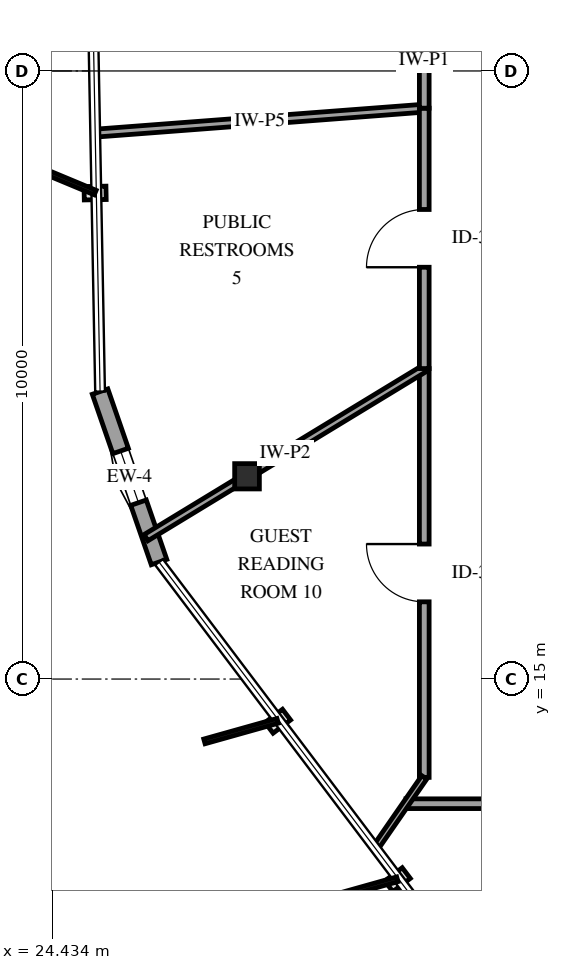
"""IFC4 building model, lengths in metres.
Left out: names, types, materials, properties, quantities, classifications, styles, units other than length and angle.
Written with IfcOpenShell. Run it as: python <this file> out.ifc"""

import sys

from ifc_helpers import new_model, si_unit, direction, frame, frame_2d, origin, origin_2d, place, context, subcontext, project, spatial, rectangle, i_section, extrude, element, fill, save


model = new_model("IFC4")
c1 = context("Model", 3, precision=1e-05, world=origin(), true_north=direction((0.0, 1.0)))
c2 = subcontext(c1, "Body", "Model", "MODEL_VIEW")
j1 = project(units=[si_unit("LENGTHUNIT", "METRE"), si_unit("PLANEANGLEUNIT", "RADIAN")], contexts=[c1])
p1 = place(None, origin())
s1 = spatial("IfcSite", under=j1, at=p1, CompositionType="ELEMENT")
p2 = place(p1, origin())
s2 = spatial("IfcBuilding", under=s1, at=p2, CompositionType="ELEMENT")
p3 = place(p2, frame((0.0, 0.0, 233.8)))
s3 = spatial("IfcBuildingStorey", under=s2, at=p3, CompositionType="ELEMENT", Elevation=233.8)
p4 = place(p3, frame((27.635, 18.334, 0.0), z_axis=(0.0, 0.0, 1.0), x_axis=(1.0, 0.0, 0.0)))
e1 = element("IfcColumn", 1, at=p4, inside=s3, PredefinedType="COLUMN", context=c2, shape_type="SweptSolid", body=[
    extrude(i_section(OverallWidth=0.406, OverallDepth=0.416, WebThickness=0.03, FlangeThickness=0.048, FilletRadius=0.038, at=origin_2d()), origin(), (0.0, 0.0, 1.0), 3.6),
])
p5 = place(p3, frame((25.219, 19.727, 0.0), z_axis=(0.0, 0.0, 1.0), x_axis=(0.326898552416, -0.945059435395, 0.0)))
e2 = element("IfcWall", 2, at=p5, inside=s3, PredefinedType="SOLIDWALL", context=c2, shape_type="SweptSolid", body=[
    extrude(rectangle(XDim=2.967, YDim=0.27, at=frame_2d((1.483, 0.0))), origin(), (0.0, 0.0, 1.0), 2.599),
])
p6 = place(p5, frame((1.033, 0.0, 0.75)))
e3 = element("IfcOpeningElement", 3, at=p6, cuts=e2, PredefinedType="OPENING", context=c2, shape_type="SweptSolid", body=[
    extrude(rectangle(XDim=0.9, YDim=1.5, at=frame_2d((0.45, 0.75))), frame((0.0, 0.145, 0.0), z_axis=(0.0, -1.0, 0.0), x_axis=(1.0, 0.0, 0.0)), (0.0, 0.0, 1.0), 0.29),
])
p7 = place(p3, frame((30.55, 13.383, 0.0), z_axis=(0.0, 0.0, 1.0), x_axis=(0.0, 1.0, 0.0)))
e4 = element("IfcWall", 4, at=p7, inside=s3, PredefinedType="PARTITIONING", context=c2, shape_type="SweptSolid", body=[
    extrude(rectangle(XDim=6.723, YDim=0.16, at=frame_2d((3.361, 0.0))), origin(), (0.0, 0.0, 1.0), 3.26),
])
p8 = place(p7, frame((2.887, 0.0, 0.0)))
e5 = element("IfcOpeningElement", 5, at=p8, cuts=e4, PredefinedType="OPENING", context=c2, shape_type="SweptSolid", body=[
    extrude(rectangle(XDim=0.95, YDim=2.15, at=frame_2d((0.475, 1.075))), frame((0.0, 0.09, 0.0), z_axis=(0.0, -1.0, 0.0), x_axis=(1.0, 0.0, 0.0)), (0.0, 0.0, 1.0), 0.18),
])
p9 = place(p3, frame((35.719, 12.95, 0.0), z_axis=(0.0, 0.0, 1.0), x_axis=(-1.0, 0.0, 0.0)))
e6 = element("IfcWall", 6, at=p9, inside=s3, PredefinedType="PARTITIONING", context=c2, shape_type="SweptSolid", body=[
    extrude(rectangle(XDim=5.469, YDim=0.16, at=frame_2d((2.734, 0.0))), origin(), (0.0, 0.0, 1.0), 3.26),
])
p10 = place(p9, frame((2.26, 0.0, 0.0)))
e7 = element("IfcOpeningElement", 7, at=p10, cuts=e6, PredefinedType="OPENING", context=c2, shape_type="SweptSolid", body=[
    extrude(rectangle(XDim=0.95, YDim=2.15, at=frame_2d((0.475, 1.075))), frame((0.0, 0.09, 0.0), z_axis=(0.0, -1.0, 0.0), x_axis=(1.0, 0.0, 0.0)), (0.0, 0.0, 1.0), 0.18),
])
p11 = place(p3, frame((30.55, 24.388, 0.0), z_axis=(0.0, 0.0, 1.0), x_axis=(-0.997129425625, -0.075715972899, 0.0)))
e8 = element("IfcWall", 8, at=p11, inside=s3, PredefinedType="PARTITIONING", context=c2, shape_type="SweptSolid", body=[
    extrude(rectangle(XDim=5.427, YDim=0.13, at=frame_2d((2.713, 0.0))), origin(), (0.0, 0.0, 1.0), 3.26),
])
p12 = place(p3, frame((30.55, 20.106, 0.0), z_axis=(0.0, 0.0, 1.0), x_axis=(-0.854558444858, -0.519355239043, 0.0)))
e9 = element("IfcWall", 9, at=p12, inside=s3, PredefinedType="PARTITIONING", context=c2, shape_type="SweptSolid", body=[
    extrude(rectangle(XDim=5.355, YDim=0.12, at=frame_2d((2.677, 0.0))), origin(), (0.0, 0.0, 1.0), 3.26),
])
p13 = place(p3, frame((30.55, 20.106, 0.0), z_axis=(0.0, 0.0, 1.0), x_axis=(0.0, 1.0, 0.0)))
e10 = element("IfcWall", 10, at=p13, inside=s3, PredefinedType="PARTITIONING", context=c2, shape_type="SweptSolid", body=[
    extrude(rectangle(XDim=4.282, YDim=0.16, at=frame_2d((2.141, 0.0))), origin(), (0.0, 0.0, 1.0), 3.26),
])
p14 = place(p13, frame((1.666, 0.0, 0.0)))
e11 = element("IfcOpeningElement", 11, at=p14, cuts=e10, PredefinedType="OPENING", context=c2, shape_type="SweptSolid", body=[
    extrude(rectangle(XDim=0.95, YDim=2.15, at=frame_2d((0.475, 1.075))), frame((0.0, 0.09, 0.0), z_axis=(0.0, -1.0, 0.0), x_axis=(1.0, 0.0, 0.0)), (0.0, 0.0, 1.0), 0.18),
])
p15 = place(p3, frame((30.55, 24.388, 0.0), z_axis=(0.0, 0.0, 1.0), x_axis=(0.0, 1.0, 0.0)))
e12 = element("IfcWall", 12, at=p15, inside=s3, PredefinedType="PARTITIONING", context=c2, shape_type="SweptSolid", body=[
    extrude(rectangle(XDim=3.963, YDim=0.16, at=frame_2d((1.981, 0.0))), origin(), (0.0, 0.0, 1.0), 3.26),
])
p16 = place(p15, frame((1.506, 0.0, 0.0)))
e13 = element("IfcOpeningElement", 13, at=p16, cuts=e12, PredefinedType="OPENING", context=c2, shape_type="SweptSolid", body=[
    extrude(rectangle(XDim=0.95, YDim=2.15, at=frame_2d((0.475, 1.075))), frame((0.0, 0.09, 0.0), z_axis=(0.0, -1.0, 0.0), x_axis=(1.0, 0.0, 0.0)), (0.0, 0.0, 1.0), 0.18),
])
p17 = place(p3, frame((30.55, 13.383, 0.0), z_axis=(0.0, 0.0, 1.0), x_axis=(-0.569335494983, -0.822105281672, 0.0)))
e14 = element("IfcWall", 14, at=p17, inside=s3, PredefinedType="PARTITIONING", context=c2, shape_type="SweptSolid", body=[
    extrude(rectangle(XDim=1.416, YDim=0.1, at=frame_2d((0.708, 0.0))), origin(), (0.0, 0.0, 1.0), 3.26),
])
p18 = place(p6, origin())
e15 = element("IfcWindow", 15, at=p18, inside=s3, PartitioningType="SINGLE_PANEL", PredefinedType="WINDOW", context=c2, shape_type="SweptSolid", body=[
    extrude(rectangle(XDim=0.9, YDim=1.5, at=frame_2d((0.45, 0.75))), frame((0.0, 0.03, 0.0), z_axis=(0.0, -1.0, 0.0), x_axis=(1.0, 0.0, 0.0)), (0.0, 0.0, 1.0), 0.06),
])
fill(e3, e15)
p19 = place(p8, origin())
e16 = element("IfcDoor", 16, at=p19, inside=s3, OperationType="SINGLE_SWING_RIGHT", PredefinedType="DOOR", context=c2, shape_type="SweptSolid", body=[
    extrude(rectangle(XDim=0.95, YDim=2.15, at=frame_2d((0.475, 1.075))), frame((0.0, 0.025, 0.0), z_axis=(0.0, -1.0, 0.0), x_axis=(1.0, 0.0, 0.0)), (0.0, 0.0, 1.0), 0.05),
])
fill(e5, e16)
p20 = place(p14, origin())
e17 = element("IfcDoor", 17, at=p20, inside=s3, OperationType="SINGLE_SWING_LEFT", PredefinedType="DOOR", context=c2, shape_type="SweptSolid", body=[
    extrude(rectangle(XDim=0.95, YDim=2.15, at=frame_2d((0.475, 1.075))), frame((0.0, 0.025, 0.0), z_axis=(0.0, -1.0, 0.0), x_axis=(1.0, 0.0, 0.0)), (0.0, 0.0, 1.0), 0.05),
])
fill(e11, e17)
save(model, sys.argv[1])
